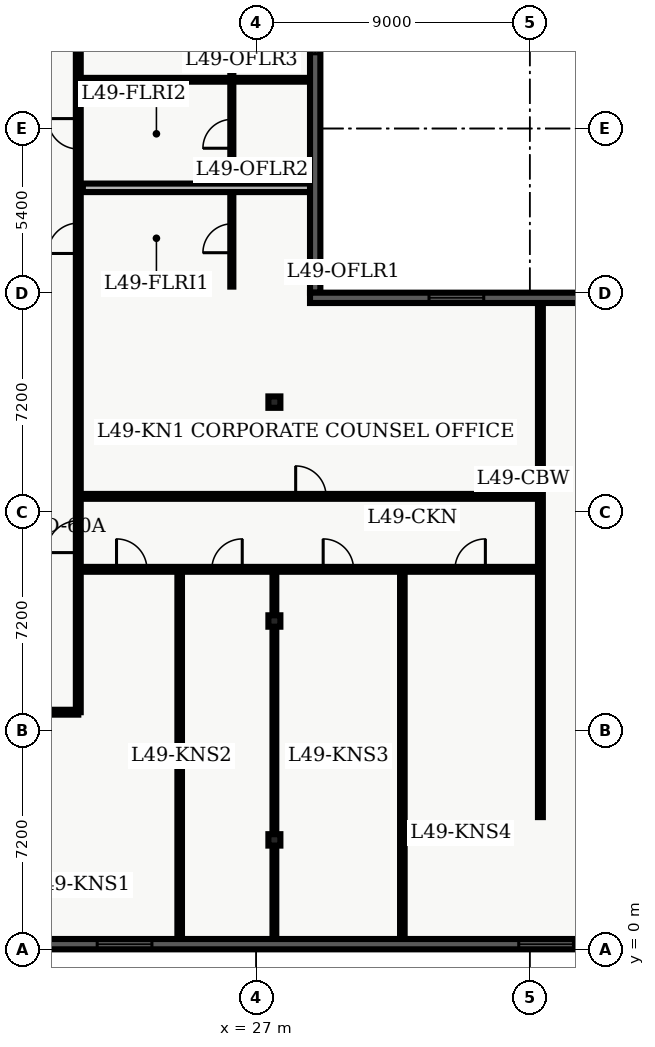
"""IFC4 building model, lengths in metres.
Left out: names, types, materials, properties, quantities, classifications, styles, units other than length and angle.
Written with IfcOpenShell. Run it as: python <this file> out.ifc"""

import sys

from ifc_helpers import new_model, entity, si_unit, converted_unit, direction, frame, origin_with_axes, origin_2d_with_axis, place, context, subcontext, project, spatial, polyline, rectangle, i_section, outline, extrude, element, fill, save


model = new_model("IFC4")
c1 = context("Model", 3, precision=1e-05, world=origin_with_axes(), true_north=direction((0.0, 1.0)))
c2 = subcontext(c1, "Body", "Model", "MODEL_VIEW")
j1 = project(units=[si_unit("LENGTHUNIT", "METRE"), converted_unit("PLANEANGLEUNIT", "DEGREE", entity("IfcPlaneAngleMeasure", 0.017), si_unit("PLANEANGLEUNIT", "RADIAN"), dimensions=[0, 0, 0, 0, 0, 0, 0])], contexts=[c1])
p1 = place(None, origin_with_axes())
s1 = spatial("IfcSite", under=j1, at=p1, CompositionType="ELEMENT")
p2 = place(p1, origin_with_axes())
s2 = spatial("IfcBuilding", under=s1, at=p2, CompositionType="ELEMENT")
p3 = place(p2, frame((0.0, 0.0, 200.4), z_axis=(0.0, 0.0, 1.0), x_axis=(1.0, 0.0, 0.0)))
s3 = spatial("IfcBuildingStorey", under=s2, at=p3, CompositionType="ELEMENT", Elevation=200.4)
for number, where, z_axis, x_axis in (
    (1, (27.6, 3.6, 0.0), (0.0, 0.0, 1.0), (1.0, 0.0, 0.0)),
    (2, (27.6, 10.8, 0.0), (0.0, 0.0, 1.0), (1.0, 0.0, 0.0)),
    (3, (27.6, 18.0, 0.0), (0.0, 0.0, 1.0), (1.0, 0.0, 0.0)),
):
    element("IfcColumn", number, at=place(p3, frame(where, z_axis=z_axis, x_axis=x_axis)), inside=s3, PredefinedType="COLUMN", context=c2, shape_type="SweptSolid", body=[
        extrude(i_section(OverallWidth=0.394, OverallDepth=0.375, WebThickness=0.017, FlangeThickness=0.028, FilletRadius=0.02, at=origin_2d_with_axis()), origin_with_axes(), (0.0, 0.0, 1.0), 3.9),
    ])
p4 = place(p3, frame((2.6, 7.8, 0.0), z_axis=(0.0, 0.0, 1.0), x_axis=(1.0, 0.0, 0.0)))
e4 = element("IfcWall", 4, at=p4, inside=s3, PredefinedType="PARTITIONING", context=c2, shape_type="SweptSolid", body=[
    extrude(outline(polyline([(0.0, -0.08), (18.55, -0.08), (18.55, 0.08), (0.0, 0.08), (0.0, -0.08)])), origin_with_axes(), (0.0, 0.0, 1.0), 2.7),
])
p5 = place(p4, frame((5.04, 0.0, 0.0), z_axis=(0.0, 0.0, 1.0), x_axis=(1.0, 0.0, 0.0)))
e5 = element("IfcOpeningElement", 5, at=p5, cuts=e4, PredefinedType="OPENING", context=c2, shape_type="SweptSolid", body=[
    extrude(rectangle(XDim=1.2, YDim=0.18, at=origin_2d_with_axis()), origin_with_axes(), (0.0, 0.0, 1.0), 2.2),
])
p6 = place(p4, frame((13.415, 0.0, 0.0), z_axis=(0.0, 0.0, 1.0), x_axis=(1.0, 0.0, 0.0)))
e6 = element("IfcOpeningElement", 6, at=p6, cuts=e4, PredefinedType="OPENING", context=c2, shape_type="SweptSolid", body=[
    extrude(rectangle(XDim=1.0, YDim=0.18, at=origin_2d_with_axis()), origin_with_axes(), (0.0, 0.0, 1.0), 2.15),
])
p7 = place(p3, frame((21.15, 7.8, 0.0), z_axis=(0.0, 0.0, 1.0), x_axis=(0.0, 1.0, 0.0)))
e7 = element("IfcWall", 7, at=p7, inside=s3, PredefinedType="PARTITIONING", context=c2, shape_type="SweptSolid", body=[
    extrude(outline(polyline([(0.0, -0.08), (32.7, -0.08), (32.7, 0.08), (0.0, 0.08), (0.0, -0.08)])), origin_with_axes(), (0.0, 0.0, 1.0), 2.7),
])
p8 = place(p7, frame((15.589, 0.0, 0.0), z_axis=(0.0, 0.0, 1.0), x_axis=(1.0, 0.0, 0.0)))
e8 = element("IfcOpeningElement", 8, at=p8, cuts=e7, PredefinedType="OPENING", context=c2, shape_type="SweptSolid", body=[
    extrude(rectangle(XDim=1.0, YDim=0.18, at=origin_2d_with_axis()), origin_with_axes(), (0.0, 0.0, 1.0), 2.15),
])
p9 = place(p7, frame((19.026, 0.0, 0.0), z_axis=(0.0, 0.0, 1.0), x_axis=(1.0, 0.0, 0.0)))
e9 = element("IfcOpeningElement", 9, at=p9, cuts=e7, PredefinedType="OPENING", context=c2, shape_type="SweptSolid", body=[
    extrude(rectangle(XDim=1.0, YDim=0.18, at=origin_2d_with_axis()), origin_with_axes(), (0.0, 0.0, 1.0), 2.15),
])
p10 = place(p7, frame((22.849, 0.0, 0.0), z_axis=(0.0, 0.0, 1.0), x_axis=(1.0, 0.0, 0.0)))
e10 = element("IfcOpeningElement", 10, at=p10, cuts=e7, PredefinedType="OPENING", context=c2, shape_type="SweptSolid", body=[
    extrude(rectangle(XDim=1.0, YDim=0.18, at=origin_2d_with_axis()), origin_with_axes(), (0.0, 0.0, 1.0), 2.15),
])
p11 = place(p7, frame((27.204, 0.0, 0.0), z_axis=(0.0, 0.0, 1.0), x_axis=(1.0, 0.0, 0.0)))
e11 = element("IfcOpeningElement", 11, at=p11, cuts=e7, PredefinedType="OPENING", context=c2, shape_type="SweptSolid", body=[
    extrude(rectangle(XDim=1.0, YDim=0.18, at=origin_2d_with_axis()), origin_with_axes(), (0.0, 0.0, 1.0), 2.15),
])
p12 = place(p7, frame((31.042, 0.0, 0.0), z_axis=(0.0, 0.0, 1.0), x_axis=(1.0, 0.0, 0.0)))
e12 = element("IfcOpeningElement", 12, at=p12, cuts=e7, PredefinedType="OPENING", context=c2, shape_type="SweptSolid", body=[
    extrude(rectangle(XDim=1.0, YDim=0.18, at=origin_2d_with_axis()), origin_with_axes(), (0.0, 0.0, 1.0), 2.15),
])
p13 = place(p7, frame((5.775, 0.0, 0.0), z_axis=(0.0, 0.0, 1.0), x_axis=(1.0, 0.0, 0.0)))
e13 = element("IfcOpeningElement", 13, at=p13, cuts=e7, PredefinedType="OPENING", context=c2, shape_type="SweptSolid", body=[
    extrude(rectangle(XDim=1.05, YDim=0.18, at=origin_2d_with_axis()), origin_with_axes(), (0.0, 0.0, 1.0), 2.15),
])
p14 = place(p3, frame((26.2, 21.8, 0.0), z_axis=(0.0, 0.0, 1.0), x_axis=(0.0, 1.0, 0.0)))
e14 = element("IfcWall", 14, at=p14, inside=s3, PredefinedType="PARTITIONING", context=c2, shape_type="SweptSolid", body=[
    extrude(outline(polyline([(0.0, -0.05), (18.5, -0.05), (18.5, 0.05), (0.0, 0.05), (0.0, -0.05)])), origin_with_axes(), (0.0, 0.0, 1.0), 2.7),
])
p15 = place(p14, frame((1.589, 0.0, 0.0), z_axis=(0.0, 0.0, 1.0), x_axis=(1.0, 0.0, 0.0)))
e15 = element("IfcOpeningElement", 15, at=p15, cuts=e14, PredefinedType="OPENING", context=c2, shape_type="SweptSolid", body=[
    extrude(rectangle(XDim=0.95, YDim=0.12, at=origin_2d_with_axis()), origin_with_axes(), (0.0, 0.0, 1.0), 2.15),
])
p16 = place(p14, frame((5.026, 0.0, 0.0), z_axis=(0.0, 0.0, 1.0), x_axis=(1.0, 0.0, 0.0)))
e16 = element("IfcOpeningElement", 16, at=p16, cuts=e14, PredefinedType="OPENING", context=c2, shape_type="SweptSolid", body=[
    extrude(rectangle(XDim=0.95, YDim=0.12, at=origin_2d_with_axis()), origin_with_axes(), (0.0, 0.0, 1.0), 2.15),
])
p17 = place(p14, frame((8.849, 0.0, 0.0), z_axis=(0.0, 0.0, 1.0), x_axis=(1.0, 0.0, 0.0)))
e17 = element("IfcOpeningElement", 17, at=p17, cuts=e14, PredefinedType="OPENING", context=c2, shape_type="SweptSolid", body=[
    extrude(rectangle(XDim=0.95, YDim=0.12, at=origin_2d_with_axis()), origin_with_axes(), (0.0, 0.0, 1.0), 2.15),
])
p18 = place(p14, frame((13.204, 0.0, 0.0), z_axis=(0.0, 0.0, 1.0), x_axis=(1.0, 0.0, 0.0)))
e18 = element("IfcOpeningElement", 18, at=p18, cuts=e14, PredefinedType="OPENING", context=c2, shape_type="SweptSolid", body=[
    extrude(rectangle(XDim=0.95, YDim=0.12, at=origin_2d_with_axis()), origin_with_axes(), (0.0, 0.0, 1.0), 2.15),
])
p19 = place(p14, frame((17.042, 0.0, 0.0), z_axis=(0.0, 0.0, 1.0), x_axis=(1.0, 0.0, 0.0)))
e19 = element("IfcOpeningElement", 19, at=p19, cuts=e14, PredefinedType="OPENING", context=c2, shape_type="SweptSolid", body=[
    extrude(rectangle(XDim=0.95, YDim=0.12, at=origin_2d_with_axis()), origin_with_axes(), (0.0, 0.0, 1.0), 2.15),
])
p20 = place(p3, frame((21.3, 25.049, 0.0), z_axis=(0.0, 0.0, 1.0), x_axis=(1.0, 0.0, 0.0)))
e20 = element("IfcWall", 20, at=p20, inside=s3, PredefinedType="PARTITIONING", context=c2, shape_type="SweptSolid", body=[
    extrude(outline(polyline([(0.0, -0.14), (7.477, -0.14), (7.477, 0.14), (0.0, 0.14), (0.0, -0.14)])), origin_with_axes(), (0.0, 0.0, 1.0), 2.7),
])
p21 = place(p3, frame((21.3, 28.603, 0.0), z_axis=(0.0, 0.0, 1.0), x_axis=(1.0, 0.0, 0.0)))
e21 = element("IfcWall", 21, at=p21, inside=s3, PredefinedType="PARTITIONING", context=c2, shape_type="SweptSolid", body=[
    extrude(outline(polyline([(0.0, -0.062), (7.477, -0.062), (7.477, 0.062), (0.0, 0.062), (0.0, -0.062)])), origin_with_axes(), (0.0, 0.0, 1.0), 2.7),
])
p22 = place(p3, frame((21.15, 12.5, 0.0), z_axis=(0.0, 0.0, 1.0), x_axis=(1.0, 0.0, 0.0)))
e22 = element("IfcWall", 22, at=p22, inside=s3, PredefinedType="PARTITIONING", context=c2, shape_type="SweptSolid", body=[
    extrude(outline(polyline([(0.0, -0.08), (15.2, -0.08), (15.2, 0.08), (0.0, 0.08), (0.0, -0.08)])), origin_with_axes(), (0.0, 0.0, 1.0), 2.7),
])
p23 = place(p22, frame((1.758, 0.0, 0.0), z_axis=(0.0, 0.0, 1.0), x_axis=(1.0, 0.0, 0.0)))
e23 = element("IfcOpeningElement", 23, at=p23, cuts=e22, PredefinedType="OPENING", context=c2, shape_type="SweptSolid", body=[
    extrude(rectangle(XDim=1.0, YDim=0.18, at=origin_2d_with_axis()), origin_with_axes(), (0.0, 0.0, 1.0), 2.15),
])
p24 = place(p22, frame((4.893, 0.0, 0.0), z_axis=(0.0, 0.0, 1.0), x_axis=(1.0, 0.0, 0.0)))
e24 = element("IfcOpeningElement", 24, at=p24, cuts=e22, PredefinedType="OPENING", context=c2, shape_type="SweptSolid", body=[
    extrude(rectangle(XDim=1.0, YDim=0.18, at=origin_2d_with_axis()), origin_with_axes(), (0.0, 0.0, 1.0), 2.15),
])
p25 = place(p22, frame((8.555, 0.0, 0.0), z_axis=(0.0, 0.0, 1.0), x_axis=(1.0, 0.0, 0.0)))
e25 = element("IfcOpeningElement", 25, at=p25, cuts=e22, PredefinedType="OPENING", context=c2, shape_type="SweptSolid", body=[
    extrude(rectangle(XDim=1.0, YDim=0.18, at=origin_2d_with_axis()), origin_with_axes(), (0.0, 0.0, 1.0), 2.15),
])
p26 = place(p22, frame((12.889, 0.0, 0.0), z_axis=(0.0, 0.0, 1.0), x_axis=(1.0, 0.0, 0.0)))
e26 = element("IfcOpeningElement", 26, at=p26, cuts=e22, PredefinedType="OPENING", context=c2, shape_type="SweptSolid", body=[
    extrude(rectangle(XDim=1.0, YDim=0.18, at=origin_2d_with_axis()), origin_with_axes(), (0.0, 0.0, 1.0), 2.15),
])
p27 = place(p3, frame((21.15, 14.9, 0.0), z_axis=(0.0, 0.0, 1.0), x_axis=(1.0, 0.0, 0.0)))
e27 = element("IfcWall", 27, at=p27, inside=s3, PredefinedType="PARTITIONING", context=c2, shape_type="SweptSolid", body=[
    extrude(outline(polyline([(0.0, -0.08), (15.2, -0.08), (15.2, 0.08), (0.0, 0.08), (0.0, -0.08)])), origin_with_axes(), (0.0, 0.0, 1.0), 2.7),
])
p28 = place(p27, frame((7.65, 0.0, 0.0), z_axis=(0.0, 0.0, 1.0), x_axis=(1.0, 0.0, 0.0)))
e28 = element("IfcOpeningElement", 28, at=p28, cuts=e27, PredefinedType="OPENING", context=c2, shape_type="SweptSolid", body=[
    extrude(rectangle(XDim=1.0, YDim=0.18, at=origin_2d_with_axis()), origin_with_axes(), (0.0, 0.0, 1.0), 2.15),
])
p29 = place(p3, frame((36.35, 4.35, 0.0), z_axis=(0.0, 0.0, 1.0), x_axis=(0.0, 1.0, 0.0)))
e29 = element("IfcWall", 29, at=p29, inside=s3, PredefinedType="PARTITIONING", context=c2, shape_type="SweptSolid", body=[
    extrude(outline(polyline([(0.0, -0.08), (16.95, -0.08), (16.95, 0.08), (0.0, 0.08), (0.0, -0.08)])), origin_with_axes(), (0.0, 0.0, 1.0), 2.7),
])
p30 = place(p3, frame((24.485, 0.335, 0.0), z_axis=(0.0, 0.0, 1.0), x_axis=(0.0, 1.0, 0.0)))
e30 = element("IfcWall", 30, at=p30, inside=s3, PredefinedType="PARTITIONING", context=c2, shape_type="SweptSolid", body=[
    extrude(outline(polyline([(0.0, -0.075), (12.045, -0.075), (12.045, 0.075), (0.0, 0.075), (0.0, -0.075)])), origin_with_axes(), (0.0, 0.0, 1.0), 2.7),
])
p31 = place(p3, frame((27.6, 0.335, 0.0), z_axis=(0.0, 0.0, 1.0), x_axis=(0.0, 1.0, 0.0)))
e31 = element("IfcWall", 31, at=p31, inside=s3, PredefinedType="PARTITIONING", context=c2, shape_type="SweptSolid", body=[
    extrude(outline(polyline([(0.0, -0.062), (12.045, -0.062), (12.045, 0.062), (0.0, 0.062), (0.0, -0.062)])), origin_with_axes(), (0.0, 0.0, 1.0), 2.7),
])
p32 = place(p3, frame((31.809, 0.335, 0.0), z_axis=(0.0, 0.0, 1.0), x_axis=(0.0, 1.0, 0.0)))
e32 = element("IfcWall", 32, at=p32, inside=s3, PredefinedType="PARTITIONING", context=c2, shape_type="SweptSolid", body=[
    extrude(outline(polyline([(0.0, -0.075), (12.045, -0.075), (12.045, 0.075), (0.0, 0.075), (0.0, -0.075)])), origin_with_axes(), (0.0, 0.0, 1.0), 2.7),
])
p33 = place(p3, frame((57.26, 0.17, 0.0), z_axis=(0.0, 0.0, 1.0), x_axis=(-1.0, 0.0, 0.0)))
e33 = element("IfcWall", 33, at=p33, inside=s3, PredefinedType="SOLIDWALL", context=c2, shape_type="SweptSolid", body=[
    extrude(outline(polyline([(0.0, -0.17), (54.86, -0.17), (54.86, 0.17), (0.0, 0.17), (0.0, -0.17)])), origin_with_axes(), (0.0, 0.0, 1.0), 3.66),
])
p34 = place(p33, frame((2.836, 0.0, 0.45), z_axis=(0.0, 0.0, 1.0), x_axis=(1.0, 0.0, 0.0)))
e34 = element("IfcOpeningElement", 34, at=p34, cuts=e33, PredefinedType="OPENING", context=c2, shape_type="SweptSolid", body=[
    extrude(rectangle(XDim=1.8, YDim=0.36, at=origin_2d_with_axis()), origin_with_axes(), (0.0, 0.0, 1.0), 2.1),
])
p35 = place(p33, frame((7.307, 0.0, 0.45), z_axis=(0.0, 0.0, 1.0), x_axis=(1.0, 0.0, 0.0)))
e35 = element("IfcOpeningElement", 35, at=p35, cuts=e33, PredefinedType="OPENING", context=c2, shape_type="SweptSolid", body=[
    extrude(rectangle(XDim=1.8, YDim=0.36, at=origin_2d_with_axis()), origin_with_axes(), (0.0, 0.0, 1.0), 2.1),
])
p36 = place(p33, frame((11.779, 0.0, 0.45), z_axis=(0.0, 0.0, 1.0), x_axis=(1.0, 0.0, 0.0)))
e36 = element("IfcOpeningElement", 36, at=p36, cuts=e33, PredefinedType="OPENING", context=c2, shape_type="SweptSolid", body=[
    extrude(rectangle(XDim=1.8, YDim=0.36, at=origin_2d_with_axis()), origin_with_axes(), (0.0, 0.0, 1.0), 2.1),
])
p37 = place(p33, frame((16.251, 0.0, 0.45), z_axis=(0.0, 0.0, 1.0), x_axis=(1.0, 0.0, 0.0)))
e37 = element("IfcOpeningElement", 37, at=p37, cuts=e33, PredefinedType="OPENING", context=c2, shape_type="SweptSolid", body=[
    extrude(rectangle(XDim=1.8, YDim=0.36, at=origin_2d_with_axis()), origin_with_axes(), (0.0, 0.0, 1.0), 2.1),
])
p38 = place(p33, frame((20.723, 0.0, 0.45), z_axis=(0.0, 0.0, 1.0), x_axis=(1.0, 0.0, 0.0)))
e38 = element("IfcOpeningElement", 38, at=p38, cuts=e33, PredefinedType="OPENING", context=c2, shape_type="SweptSolid", body=[
    extrude(rectangle(XDim=1.8, YDim=0.36, at=origin_2d_with_axis()), origin_with_axes(), (0.0, 0.0, 1.0), 2.1),
])
p39 = place(p33, frame((34.588, 0.0, 0.45), z_axis=(0.0, 0.0, 1.0), x_axis=(1.0, 0.0, 0.0)))
e39 = element("IfcOpeningElement", 39, at=p39, cuts=e33, PredefinedType="OPENING", context=c2, shape_type="SweptSolid", body=[
    extrude(rectangle(XDim=1.8, YDim=0.36, at=origin_2d_with_axis()), origin_with_axes(), (0.0, 0.0, 1.0), 2.1),
])
p40 = place(p33, frame((38.609, 0.0, 0.45), z_axis=(0.0, 0.0, 1.0), x_axis=(1.0, 0.0, 0.0)))
e40 = element("IfcOpeningElement", 40, at=p40, cuts=e33, PredefinedType="OPENING", context=c2, shape_type="SweptSolid", body=[
    extrude(rectangle(XDim=1.8, YDim=0.36, at=origin_2d_with_axis()), origin_with_axes(), (0.0, 0.0, 1.0), 2.1),
])
p41 = place(p33, frame((43.081, 0.0, 0.45), z_axis=(0.0, 0.0, 1.0), x_axis=(1.0, 0.0, 0.0)))
e41 = element("IfcOpeningElement", 41, at=p41, cuts=e33, PredefinedType="OPENING", context=c2, shape_type="SweptSolid", body=[
    extrude(rectangle(XDim=1.8, YDim=0.36, at=origin_2d_with_axis()), origin_with_axes(), (0.0, 0.0, 1.0), 2.1),
])
p42 = place(p33, frame((48.003, 0.0, 0.45), z_axis=(0.0, 0.0, 1.0), x_axis=(1.0, 0.0, 0.0)))
e42 = element("IfcOpeningElement", 42, at=p42, cuts=e33, PredefinedType="OPENING", context=c2, shape_type="SweptSolid", body=[
    extrude(rectangle(XDim=1.8, YDim=0.36, at=origin_2d_with_axis()), origin_with_axes(), (0.0, 0.0, 1.0), 2.1),
])
p43 = place(p33, frame((52.024, 0.0, 0.45), z_axis=(0.0, 0.0, 1.0), x_axis=(1.0, 0.0, 0.0)))
e43 = element("IfcOpeningElement", 43, at=p43, cuts=e33, PredefinedType="OPENING", context=c2, shape_type="SweptSolid", body=[
    extrude(rectangle(XDim=1.8, YDim=0.36, at=origin_2d_with_axis()), origin_with_axes(), (0.0, 0.0, 1.0), 2.1),
])
p44 = place(p3, frame((28.942, 42.02, 0.0), z_axis=(0.0, 0.0, 1.0), x_axis=(0.0, -1.0, 0.0)))
e44 = element("IfcWall", 44, at=p44, inside=s3, PredefinedType="SOLIDWALL", context=c2, shape_type="SweptSolid", body=[
    extrude(outline(polyline([(0.0, -0.17), (20.42, -0.17), (20.42, 0.17), (0.0, 0.17), (0.0, -0.17)])), origin_with_axes(), (0.0, 0.0, 1.0), 3.66),
])
p45 = place(p44, frame((3.003, 0.0, 0.45), z_axis=(0.0, 0.0, 1.0), x_axis=(1.0, 0.0, 0.0)))
e45 = element("IfcOpeningElement", 45, at=p45, cuts=e44, PredefinedType="OPENING", context=c2, shape_type="SweptSolid", body=[
    extrude(rectangle(XDim=1.6, YDim=0.36, at=origin_2d_with_axis()), origin_with_axes(), (0.0, 0.0, 1.0), 2.2),
])
p46 = place(p44, frame((7.808, 0.0, 0.45), z_axis=(0.0, 0.0, 1.0), x_axis=(1.0, 0.0, 0.0)))
e46 = element("IfcOpeningElement", 46, at=p46, cuts=e44, PredefinedType="OPENING", context=c2, shape_type="SweptSolid", body=[
    extrude(rectangle(XDim=1.6, YDim=0.36, at=origin_2d_with_axis()), origin_with_axes(), (0.0, 0.0, 1.0), 2.2),
])
p47 = place(p44, frame((11.762, 0.0, 0.45), z_axis=(0.0, 0.0, 1.0), x_axis=(1.0, 0.0, 0.0)))
e47 = element("IfcOpeningElement", 47, at=p47, cuts=e44, PredefinedType="OPENING", context=c2, shape_type="SweptSolid", body=[
    extrude(rectangle(XDim=1.6, YDim=0.36, at=origin_2d_with_axis()), origin_with_axes(), (0.0, 0.0, 1.0), 2.2),
])
p48 = place(p3, frame((28.772, 21.43, 0.0), z_axis=(0.0, 0.0, 1.0), x_axis=(1.0, 0.0, 0.0)))
e48 = element("IfcWall", 48, at=p48, inside=s3, PredefinedType="SOLIDWALL", context=c2, shape_type="SweptSolid", body=[
    extrude(outline(polyline([(0.0, -0.17), (9.628, -0.17), (9.628, 0.17), (0.0, 0.17), (0.0, -0.17)])), origin_with_axes(), (0.0, 0.0, 1.0), 3.66),
])
p49 = place(p48, frame((4.814, 0.0, 0.45), z_axis=(0.0, 0.0, 1.0), x_axis=(1.0, 0.0, 0.0)))
e49 = element("IfcOpeningElement", 49, at=p49, cuts=e48, PredefinedType="OPENING", context=c2, shape_type="SweptSolid", body=[
    extrude(rectangle(XDim=1.8, YDim=0.36, at=origin_2d_with_axis()), origin_with_axes(), (0.0, 0.0, 1.0), 2.1),
])
p50 = place(p14, frame((1.589, 0.0, 0.0), z_axis=(0.0, 0.0, 1.0), x_axis=(1.0, 0.0, 0.0)))
e50 = element("IfcDoor", 50, at=p50, inside=s3, OperationType="SINGLE_SWING_LEFT", PredefinedType="DOOR", context=c2, shape_type="SweptSolid", body=[
    extrude(rectangle(XDim=0.95, YDim=0.06, at=origin_2d_with_axis()), origin_with_axes(), (0.0, 0.0, 1.0), 2.15),
])
fill(e15, e50)
p51 = place(p7, frame((15.589, 0.0, 0.0), z_axis=(0.0, 0.0, 1.0), x_axis=(1.0, 0.0, 0.0)))
e51 = element("IfcDoor", 51, at=p51, inside=s3, OperationType="SINGLE_SWING_LEFT", PredefinedType="DOOR", context=c2, shape_type="SweptSolid", body=[
    extrude(rectangle(XDim=1.0, YDim=0.09, at=origin_2d_with_axis()), origin_with_axes(), (0.0, 0.0, 1.0), 2.15),
])
fill(e8, e51)
p52 = place(p14, frame((5.026, 0.0, 0.0), z_axis=(0.0, 0.0, 1.0), x_axis=(1.0, 0.0, 0.0)))
e52 = element("IfcDoor", 52, at=p52, inside=s3, OperationType="SINGLE_SWING_LEFT", PredefinedType="DOOR", context=c2, shape_type="SweptSolid", body=[
    extrude(rectangle(XDim=0.95, YDim=0.06, at=origin_2d_with_axis()), origin_with_axes(), (0.0, 0.0, 1.0), 2.15),
])
fill(e16, e52)
p53 = place(p7, frame((19.026, 0.0, 0.0), z_axis=(0.0, 0.0, 1.0), x_axis=(1.0, 0.0, 0.0)))
e53 = element("IfcDoor", 53, at=p53, inside=s3, OperationType="SINGLE_SWING_RIGHT", PredefinedType="DOOR", context=c2, shape_type="SweptSolid", body=[
    extrude(rectangle(XDim=1.0, YDim=0.09, at=origin_2d_with_axis()), origin_with_axes(), (0.0, 0.0, 1.0), 2.15),
])
fill(e9, e53)
p54 = place(p7, frame((5.775, 0.0, 0.0), z_axis=(0.0, 0.0, 1.0), x_axis=(1.0, 0.0, 0.0)))
e54 = element("IfcDoor", 54, at=p54, inside=s3, OperationType="SINGLE_SWING_LEFT", PredefinedType="DOOR", context=c2, shape_type="SweptSolid", body=[
    extrude(rectangle(XDim=1.05, YDim=0.09, at=origin_2d_with_axis()), origin_with_axes(), (0.0, 0.0, 1.0), 2.15),
])
fill(e13, e54)
p55 = place(p22, frame((1.758, 0.0, 0.0), z_axis=(0.0, 0.0, 1.0), x_axis=(1.0, 0.0, 0.0)))
e55 = element("IfcDoor", 55, at=p55, inside=s3, OperationType="SINGLE_SWING_LEFT", PredefinedType="DOOR", context=c2, shape_type="SweptSolid", body=[
    extrude(rectangle(XDim=1.0, YDim=0.09, at=origin_2d_with_axis()), origin_with_axes(), (0.0, 0.0, 1.0), 2.15),
])
fill(e23, e55)
p56 = place(p22, frame((4.893, 0.0, 0.0), z_axis=(0.0, 0.0, 1.0), x_axis=(1.0, 0.0, 0.0)))
e56 = element("IfcDoor", 56, at=p56, inside=s3, OperationType="SINGLE_SWING_RIGHT", PredefinedType="DOOR", context=c2, shape_type="SweptSolid", body=[
    extrude(rectangle(XDim=1.0, YDim=0.09, at=origin_2d_with_axis()), origin_with_axes(), (0.0, 0.0, 1.0), 2.15),
])
fill(e24, e56)
p57 = place(p22, frame((8.555, 0.0, 0.0), z_axis=(0.0, 0.0, 1.0), x_axis=(1.0, 0.0, 0.0)))
e57 = element("IfcDoor", 57, at=p57, inside=s3, OperationType="SINGLE_SWING_LEFT", PredefinedType="DOOR", context=c2, shape_type="SweptSolid", body=[
    extrude(rectangle(XDim=1.0, YDim=0.09, at=origin_2d_with_axis()), origin_with_axes(), (0.0, 0.0, 1.0), 2.15),
])
fill(e25, e57)
p58 = place(p22, frame((12.889, 0.0, 0.0), z_axis=(0.0, 0.0, 1.0), x_axis=(1.0, 0.0, 0.0)))
e58 = element("IfcDoor", 58, at=p58, inside=s3, OperationType="SINGLE_SWING_RIGHT", PredefinedType="DOOR", context=c2, shape_type="SweptSolid", body=[
    extrude(rectangle(XDim=1.0, YDim=0.09, at=origin_2d_with_axis()), origin_with_axes(), (0.0, 0.0, 1.0), 2.15),
])
fill(e26, e58)
p59 = place(p27, frame((7.65, 0.0, 0.0), z_axis=(0.0, 0.0, 1.0), x_axis=(1.0, 0.0, 0.0)))
e59 = element("IfcDoor", 59, at=p59, inside=s3, OperationType="SINGLE_SWING_LEFT", PredefinedType="DOOR", context=c2, shape_type="SweptSolid", body=[
    extrude(rectangle(XDim=1.0, YDim=0.09, at=origin_2d_with_axis()), origin_with_axes(), (0.0, 0.0, 1.0), 2.15),
])
fill(e28, e59)
p60 = place(p33, frame((20.723, 0.0, 0.45), z_axis=(0.0, 0.0, 1.0), x_axis=(1.0, 0.0, 0.0)))
e60 = element("IfcWindow", 60, at=p60, inside=s3, PredefinedType="WINDOW", context=c2, shape_type="SweptSolid", body=[
    extrude(rectangle(XDim=1.8, YDim=0.09, at=origin_2d_with_axis()), origin_with_axes(), (0.0, 0.0, 1.0), 2.1),
])
fill(e38, e60)
p61 = place(p33, frame((34.588, 0.0, 0.45), z_axis=(0.0, 0.0, 1.0), x_axis=(1.0, 0.0, 0.0)))
e61 = element("IfcWindow", 61, at=p61, inside=s3, PredefinedType="WINDOW", context=c2, shape_type="SweptSolid", body=[
    extrude(rectangle(XDim=1.8, YDim=0.09, at=origin_2d_with_axis()), origin_with_axes(), (0.0, 0.0, 1.0), 2.1),
])
fill(e39, e61)
p62 = place(p44, frame((11.762, 0.0, 0.45), z_axis=(0.0, 0.0, 1.0), x_axis=(1.0, 0.0, 0.0)))
e62 = element("IfcWindow", 62, at=p62, inside=s3, PredefinedType="WINDOW", context=c2, shape_type="SweptSolid", body=[
    extrude(rectangle(XDim=1.6, YDim=0.09, at=origin_2d_with_axis()), origin_with_axes(), (0.0, 0.0, 1.0), 2.2),
])
fill(e47, e62)
p63 = place(p48, frame((4.814, 0.0, 0.45), z_axis=(0.0, 0.0, 1.0), x_axis=(1.0, 0.0, 0.0)))
e63 = element("IfcWindow", 63, at=p63, inside=s3, PredefinedType="WINDOW", context=c2, shape_type="SweptSolid", body=[
    extrude(rectangle(XDim=1.8, YDim=0.09, at=origin_2d_with_axis()), origin_with_axes(), (0.0, 0.0, 1.0), 2.1),
])
fill(e49, e63)
save(model, sys.argv[1])
